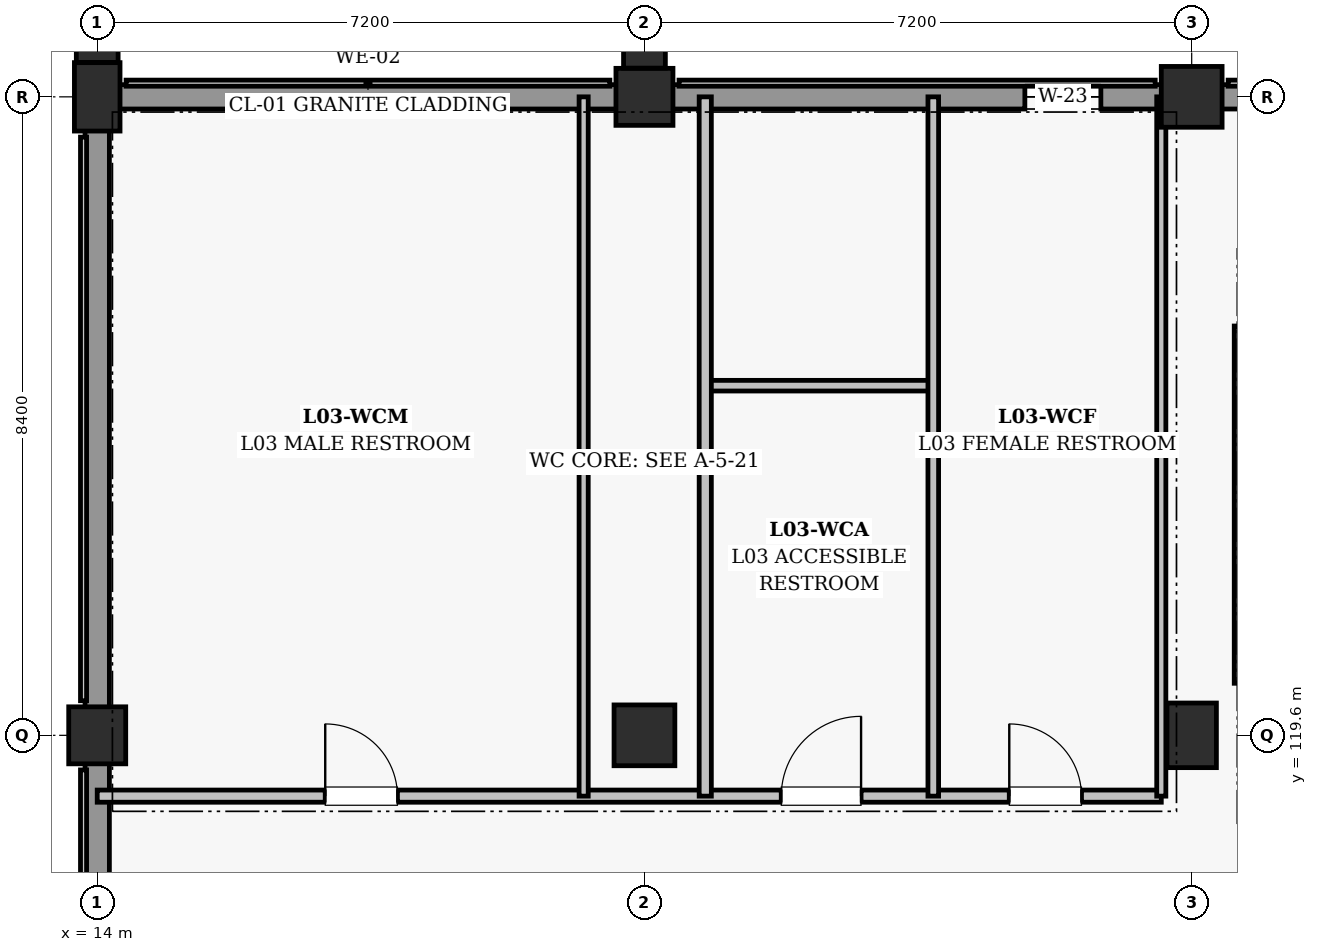
"""IFC4 building model, lengths in metres.
Left out: names, types, materials, properties, quantities, classifications, styles, units other than length and angle.
Written with IfcOpenShell. Run it as: python <this file> out.ifc"""

import sys

from ifc_helpers import new_model, si_unit, direction, frame, frame_2d, origin, origin_2d, place, context, subcontext, project, spatial, rectangle, extrude, element, fill, save


model = new_model("IFC4")
c1 = context("Model", 3, precision=1e-05, world=origin(), true_north=direction((0.0, 1.0)))
c2 = subcontext(c1, "Body", "Model", "MODEL_VIEW")
j1 = project(units=[si_unit("LENGTHUNIT", "METRE"), si_unit("PLANEANGLEUNIT", "RADIAN")], contexts=[c1])
p1 = place(None, origin())
s1 = spatial("IfcSite", under=j1, at=p1, CompositionType="ELEMENT")
p2 = place(p1, origin())
s2 = spatial("IfcBuilding", under=s1, at=p2, CompositionType="ELEMENT")
p3 = place(p2, frame((0.0, 0.0, 14.4)))
s3 = spatial("IfcBuildingStorey", under=s2, at=p3, CompositionType="ELEMENT", Elevation=14.4)
p4 = place(p3, frame((14.0, 119.6, 0.0), z_axis=(0.0, 0.0, 1.0), x_axis=(1.0, 0.0, 0.0)))
e1 = element("IfcColumn", 1, at=p4, inside=s3, PredefinedType="COLUMN", context=c2, shape_type="SweptSolid", body=[
    extrude(rectangle(XDim=0.75, YDim=0.75, at=origin_2d()), origin(), (0.0, 0.0, 1.0), 4.5),
])
p5 = place(p3, frame((14.0, 128.0, 0.0), z_axis=(0.0, 0.0, 1.0), x_axis=(1.0, 0.0, 0.0)))
e2 = element("IfcColumn", 2, at=p5, inside=s3, PredefinedType="COLUMN", context=c2, shape_type="SweptSolid", body=[
    extrude(rectangle(XDim=0.6, YDim=0.9, at=origin_2d()), origin(), (0.0, 0.0, 1.0), 4.5),
])
p6 = place(p3, frame((21.2, 119.6, 0.0), z_axis=(0.0, 0.0, 1.0), x_axis=(1.0, 0.0, 0.0)))
e3 = element("IfcColumn", 3, at=p6, inside=s3, PredefinedType="COLUMN", context=c2, shape_type="SweptSolid", body=[
    extrude(rectangle(XDim=0.8, YDim=0.8, at=origin_2d()), origin(), (0.0, 0.0, 1.0), 4.5),
])
p7 = place(p3, frame((21.2, 128.0, 0.0), z_axis=(0.0, 0.0, 1.0), x_axis=(1.0, 0.0, 0.0)))
e4 = element("IfcColumn", 4, at=p7, inside=s3, PredefinedType="COLUMN", context=c2, shape_type="SweptSolid", body=[
    extrude(rectangle(XDim=0.75, YDim=0.75, at=origin_2d()), origin(), (0.0, 0.0, 1.0), 4.5),
])
p8 = place(p3, frame((28.4, 119.6, 0.0), z_axis=(0.0, 0.0, 1.0), x_axis=(1.0, 0.0, 0.0)))
e5 = element("IfcColumn", 5, at=p8, inside=s3, PredefinedType="COLUMN", context=c2, shape_type="SweptSolid", body=[
    extrude(rectangle(XDim=0.65, YDim=0.85, at=origin_2d()), origin(), (0.0, 0.0, 1.0), 4.5),
])
p9 = place(p3, frame((28.4, 128.0, 0.0), z_axis=(0.0, 0.0, 1.0), x_axis=(1.0, 0.0, 0.0)))
e6 = element("IfcColumn", 6, at=p9, inside=s3, PredefinedType="COLUMN", context=c2, shape_type="SweptSolid", body=[
    extrude(rectangle(XDim=0.8, YDim=0.8, at=origin_2d()), origin(), (0.0, 0.0, 1.0), 4.5),
])
for number, where, z_axis, x_axis in (
    (7, (14.0, 128.853, 0.0), (0.0, 0.0, 1.0), (1.0, 0.0, 0.0)),
    (8, (21.2, 128.778, 0.0), (0.0, 0.0, 1.0), (1.0, 0.0, 0.0)),
):
    element("IfcColumn", number, at=place(p3, frame(where, z_axis=z_axis, x_axis=x_axis)), inside=s3, PredefinedType="PILASTER", context=c2, shape_type="SweptSolid", body=[
        extrude(rectangle(XDim=0.55, YDim=0.8, at=origin_2d()), origin(), (0.0, 0.0, 1.0), 4.5),
    ])
p10 = place(p3, frame((14.28, 128.0, 0.0), z_axis=(0.0, 0.0, 1.0), x_axis=(1.0, 0.0, 0.0)))
e9 = element("IfcWall", 9, at=p10, inside=s3, PredefinedType="SOLIDWALL", context=c2, shape_type="SweptSolid", body=[
    extrude(rectangle(XDim=6.565, YDim=0.32, at=frame_2d((3.282, 0.0))), origin(), (0.0, 0.0, 1.0), 3.305),
])
p11 = place(p3, frame((21.555, 128.0, 0.0), z_axis=(0.0, 0.0, 1.0), x_axis=(1.0, 0.0, 0.0)))
e10 = element("IfcWall", 10, at=p11, inside=s3, PredefinedType="SOLIDWALL", context=c2, shape_type="SweptSolid", body=[
    extrude(rectangle(XDim=6.465, YDim=0.32, at=frame_2d((3.232, 0.0))), origin(), (0.0, 0.0, 1.0), 3.305),
])
p12 = place(p11, frame((4.65, 0.0, 1.85)))
e11 = element("IfcOpeningElement", 11, at=p12, cuts=e10, PredefinedType="OPENING", context=c2, shape_type="SweptSolid", body=[
    extrude(rectangle(XDim=1.0, YDim=0.95, at=frame_2d((0.5, 0.475))), frame((0.0, 0.17, 0.0), z_axis=(0.0, -1.0, 0.0), x_axis=(1.0, 0.0, 0.0)), (0.0, 0.0, 1.0), 0.34),
])
p13 = place(p3, frame((28.78, 128.0, 0.0), z_axis=(0.0, 0.0, 1.0), x_axis=(1.0, 0.0, 0.0)))
e12 = element("IfcWall", 12, at=p13, inside=s3, PredefinedType="SOLIDWALL", context=c2, shape_type="SweptSolid", body=[
    extrude(rectangle(XDim=6.515, YDim=0.32, at=frame_2d((3.257, 0.0))), origin(), (0.0, 0.0, 1.0), 3.355),
])
p14 = place(p3, frame((14.0, 111.555, 0.0), z_axis=(0.0, 0.0, 1.0), x_axis=(0.0, 1.0, 0.0)))
e13 = element("IfcWall", 13, at=p14, inside=s3, PredefinedType="SOLIDWALL", context=c2, shape_type="SweptSolid", body=[
    extrude(rectangle(XDim=7.69, YDim=0.32, at=frame_2d((3.845, 0.0))), origin(), (0.0, 0.0, 1.0), 3.405),
])
p15 = place(p3, frame((14.0, 119.955, 0.0), z_axis=(0.0, 0.0, 1.0), x_axis=(0.0, 1.0, 0.0)))
e14 = element("IfcWall", 14, at=p15, inside=s3, PredefinedType="SOLIDWALL", context=c2, shape_type="SweptSolid", body=[
    extrude(rectangle(XDim=7.615, YDim=0.32, at=frame_2d((3.808, 0.0))), origin(), (0.0, 0.0, 1.0), 3.405),
])
p16 = place(p3, frame((29.085, 124.985, 0.0), z_axis=(0.0, 0.0, 1.0), x_axis=(0.0, -1.0, 0.0)))
e15 = element("IfcWall", 15, at=p16, inside=s3, PredefinedType="SHEAR", context=c2, shape_type="SweptSolid", body=[
    extrude(rectangle(XDim=4.7, YDim=0.25, at=frame_2d((2.35, 0.0))), origin(), (0.0, 0.0, 1.0), 4.175),
])
p17 = place(p3, frame((14.0, 118.8, 0.0), z_axis=(0.0, 0.0, 1.0), x_axis=(1.0, 0.0, 0.0)))
e16 = element("IfcWall", 16, at=p17, inside=s3, PredefinedType="PARTITIONING", context=c2, shape_type="SweptSolid", body=[
    extrude(rectangle(XDim=14.0, YDim=0.16, at=frame_2d((7.0, 0.0))), origin(), (0.0, 0.0, 1.0), 3.36),
])
p18 = place(p17, frame((3.0, 0.0, 0.0)))
e17 = element("IfcOpeningElement", 17, at=p18, cuts=e16, PredefinedType="OPENING", context=c2, shape_type="SweptSolid", body=[
    extrude(rectangle(XDim=0.95, YDim=2.15, at=frame_2d((0.475, 1.075))), frame((0.0, 0.09, 0.0), z_axis=(0.0, -1.0, 0.0), x_axis=(1.0, 0.0, 0.0)), (0.0, 0.0, 1.0), 0.18),
])
p19 = place(p17, frame((9.0, 0.0, 0.0)))
e18 = element("IfcOpeningElement", 18, at=p19, cuts=e16, PredefinedType="OPENING", context=c2, shape_type="SweptSolid", body=[
    extrude(rectangle(XDim=1.05, YDim=2.15, at=frame_2d((0.525, 1.075))), frame((0.0, 0.09, 0.0), z_axis=(0.0, -1.0, 0.0), x_axis=(1.0, 0.0, 0.0)), (0.0, 0.0, 1.0), 0.18),
])
p20 = place(p17, frame((12.0, 0.0, 0.0)))
e19 = element("IfcOpeningElement", 19, at=p20, cuts=e16, PredefinedType="OPENING", context=c2, shape_type="SweptSolid", body=[
    extrude(rectangle(XDim=0.95, YDim=2.15, at=frame_2d((0.475, 1.075))), frame((0.0, 0.09, 0.0), z_axis=(0.0, -1.0, 0.0), x_axis=(1.0, 0.0, 0.0)), (0.0, 0.0, 1.0), 0.18),
])
p21 = place(p3, frame((22.0, 124.2, 0.0), z_axis=(0.0, 0.0, 1.0), x_axis=(1.0, 0.0, 0.0)))
e20 = element("IfcWall", 20, at=p21, inside=s3, PredefinedType="PARTITIONING", context=c2, shape_type="SweptSolid", body=[
    extrude(rectangle(XDim=3.0, YDim=0.14, at=frame_2d((1.5, 0.0))), origin(), (0.0, 0.0, 1.0), 3.56),
])
p22 = place(p3, frame((20.4, 118.8, 0.0), z_axis=(0.0, 0.0, 1.0), x_axis=(0.0, 1.0, 0.0)))
e21 = element("IfcWall", 21, at=p22, inside=s3, PredefinedType="PARTITIONING", context=c2, shape_type="SweptSolid", body=[
    extrude(rectangle(XDim=9.2, YDim=0.12, at=frame_2d((4.6, 0.0))), origin(), (0.0, 0.0, 1.0), 3.41),
])
p23 = place(p3, frame((22.0, 118.8, 0.0), z_axis=(0.0, 0.0, 1.0), x_axis=(0.0, 1.0, 0.0)))
e22 = element("IfcWall", 22, at=p23, inside=s3, PredefinedType="PARTITIONING", context=c2, shape_type="SweptSolid", body=[
    extrude(rectangle(XDim=9.2, YDim=0.16, at=frame_2d((4.6, 0.0))), origin(), (0.0, 0.0, 1.0), 3.36),
])
p24 = place(p3, frame((25.0, 118.8, 0.0), z_axis=(0.0, 0.0, 1.0), x_axis=(0.0, 1.0, 0.0)))
e23 = element("IfcWall", 23, at=p24, inside=s3, PredefinedType="PARTITIONING", context=c2, shape_type="SweptSolid", body=[
    extrude(rectangle(XDim=9.2, YDim=0.14, at=frame_2d((4.6, 0.0))), origin(), (0.0, 0.0, 1.0), 3.36),
])
p25 = place(p3, frame((28.0, 118.8, 0.0), z_axis=(0.0, 0.0, 1.0), x_axis=(0.0, 1.0, 0.0)))
e24 = element("IfcWall", 24, at=p25, inside=s3, PredefinedType="PARTITIONING", context=c2, shape_type="SweptSolid", body=[
    extrude(rectangle(XDim=9.2, YDim=0.12, at=frame_2d((4.6, 0.0))), origin(), (0.0, 0.0, 1.0), 3.36),
])
p26 = place(p12, origin())
e25 = element("IfcWindow", 25, at=p26, inside=s3, PartitioningType="SINGLE_PANEL", PredefinedType="WINDOW", context=c2, shape_type="SweptSolid", body=[
    extrude(rectangle(XDim=1.0, YDim=0.95, at=frame_2d((0.5, 0.475))), frame((0.0, 0.03, 0.0), z_axis=(0.0, -1.0, 0.0), x_axis=(1.0, 0.0, 0.0)), (0.0, 0.0, 1.0), 0.06),
])
fill(e11, e25)
p27 = place(p18, origin())
e26 = element("IfcDoor", 26, at=p27, inside=s3, OperationType="SINGLE_SWING_LEFT", PredefinedType="DOOR", context=c2, shape_type="SweptSolid", body=[
    extrude(rectangle(XDim=0.95, YDim=2.15, at=frame_2d((0.475, 1.075))), frame((0.0, 0.025, 0.0), z_axis=(0.0, -1.0, 0.0), x_axis=(1.0, 0.0, 0.0)), (0.0, 0.0, 1.0), 0.05),
])
fill(e17, e26)
p28 = place(p19, origin())
e27 = element("IfcDoor", 27, at=p28, inside=s3, OperationType="SINGLE_SWING_RIGHT", PredefinedType="DOOR", context=c2, shape_type="SweptSolid", body=[
    extrude(rectangle(XDim=1.05, YDim=2.15, at=frame_2d((0.525, 1.075))), frame((0.0, 0.025, 0.0), z_axis=(0.0, -1.0, 0.0), x_axis=(1.0, 0.0, 0.0)), (0.0, 0.0, 1.0), 0.05),
])
fill(e18, e27)
p29 = place(p20, origin())
e28 = element("IfcDoor", 28, at=p29, inside=s3, OperationType="SINGLE_SWING_LEFT", PredefinedType="DOOR", context=c2, shape_type="SweptSolid", body=[
    extrude(rectangle(XDim=0.95, YDim=2.15, at=frame_2d((0.475, 1.075))), frame((0.0, 0.025, 0.0), z_axis=(0.0, -1.0, 0.0), x_axis=(1.0, 0.0, 0.0)), (0.0, 0.0, 1.0), 0.05),
])
fill(e19, e28)
save(model, sys.argv[1])
